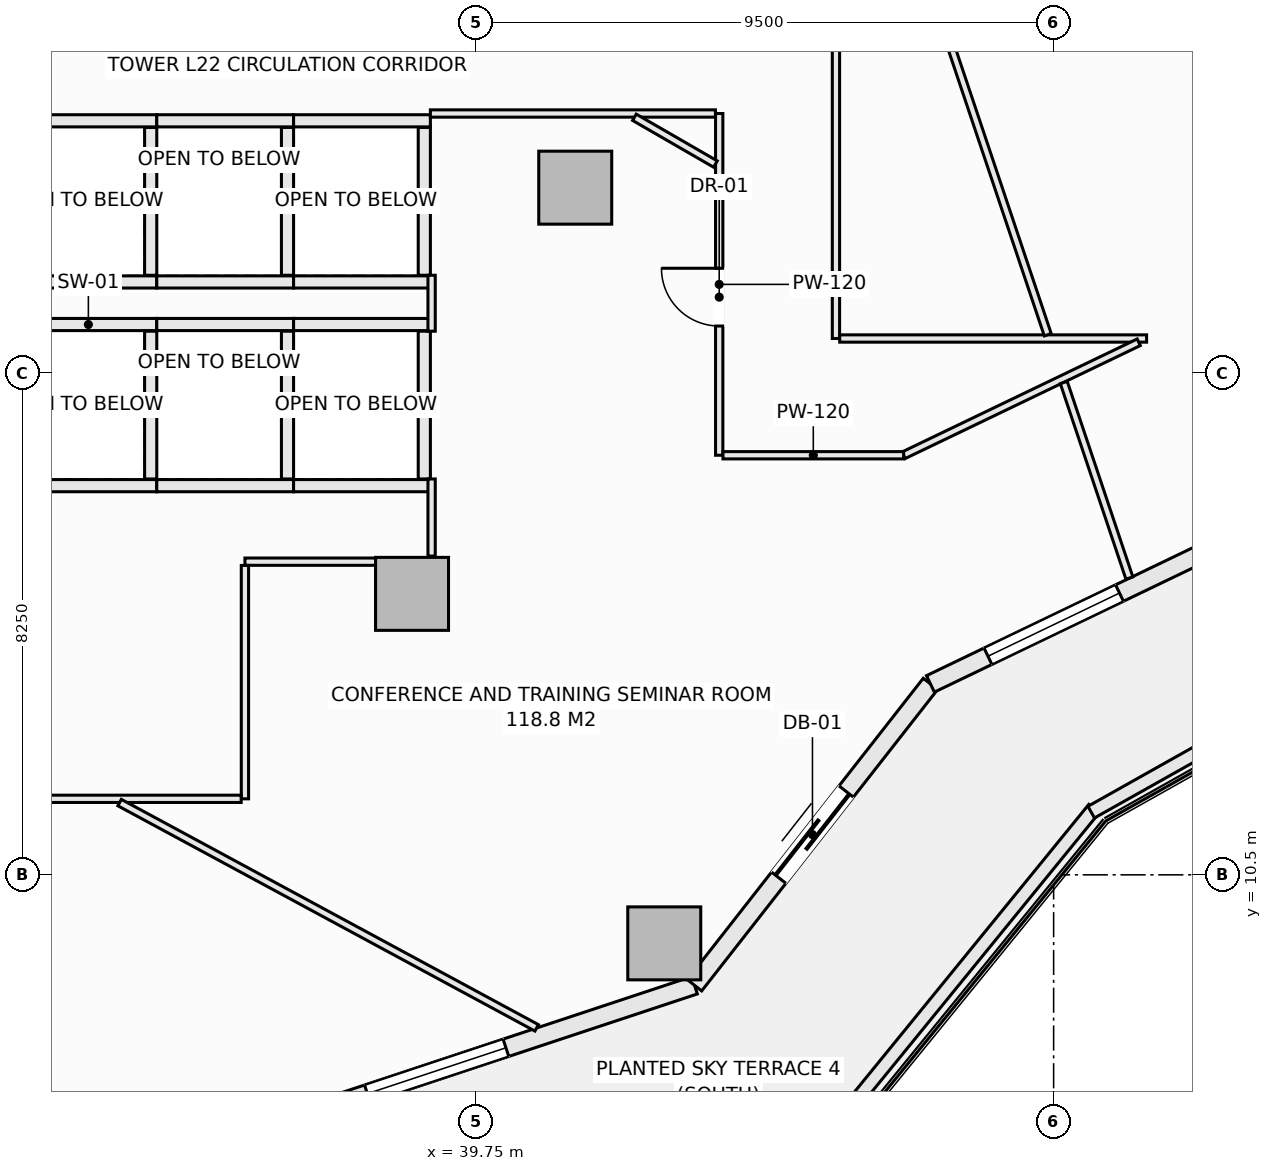
"""IFC4 building model, lengths in metres.
Left out: names, types, materials, properties, quantities, classifications, styles, units other than length and angle.
Written with IfcOpenShell. Run it as: python <this file> out.ifc"""

import sys

from ifc_helpers import new_model, si_unit, direction, frame, frame_2d, origin, origin_2d, place, context, subcontext, project, spatial, rectangle, extrude, element, fill, save


model = new_model("IFC4")
c1 = context("Model", 3, precision=1e-05, world=origin(), true_north=direction((0.0, 1.0)))
c2 = subcontext(c1, "Body", "Model", "MODEL_VIEW")
j1 = project(units=[si_unit("LENGTHUNIT", "METRE"), si_unit("PLANEANGLEUNIT", "RADIAN")], contexts=[c1])
p1 = place(None, origin())
s1 = spatial("IfcSite", under=j1, at=p1, CompositionType="ELEMENT")
p2 = place(p1, origin())
s2 = spatial("IfcBuilding", under=s1, at=p2, CompositionType="ELEMENT")
p3 = place(p2, frame((0.0, 0.0, 91.95)))
s3 = spatial("IfcBuildingStorey", under=s2, at=p3, CompositionType="ELEMENT", Elevation=91.95)
for number, where, z_axis, x_axis in (
    (1, (42.846, 9.373, -0.28), (0.0, 0.0, 1.0), (1.0, 0.0, 0.0)),
    (2, (38.698, 15.121, -0.28), (0.0, 0.0, 1.0), (1.0, 0.0, 0.0)),
    (3, (41.382, 21.801, -0.28), (0.0, 0.0, 1.0), (1.0, 0.0, 0.0)),
):
    element("IfcColumn", number, at=place(p3, frame(where, z_axis=z_axis, x_axis=x_axis)), inside=s3, PredefinedType="COLUMN", context=c2, shape_type="SweptSolid", body=[
        extrude(rectangle(XDim=1.2, YDim=1.2, at=origin_2d()), origin(), (0.0, 0.0, 1.0), 3.81),
    ])
p4 = place(p3, frame((36.968, 6.571, 0.0), z_axis=(0.0, 0.0, 1.0), x_axis=(0.949245153629, 0.314537181127, 0.0)))
e4 = element("IfcWall", 4, at=p4, inside=s3, PredefinedType="SOLIDWALL", context=c2, shape_type="SweptSolid", body=[
    extrude(rectangle(XDim=6.717, YDim=0.3, at=frame_2d((3.358, 0.0))), origin(), (0.0, 0.0, 1.0), 3.053),
])
p5 = place(p4, frame((1.05, 0.0, 0.85)))
e5 = element("IfcOpeningElement", 5, at=p5, cuts=e4, PredefinedType="OPENING", context=c2, shape_type="SweptSolid", body=[
    extrude(rectangle(XDim=2.4, YDim=1.9, at=frame_2d((1.2, 0.95))), frame((0.0, 0.16, 0.0), z_axis=(0.0, -1.0, 0.0), x_axis=(1.0, 0.0, 0.0)), (0.0, 0.0, 1.0), 0.32),
])
p6 = place(p3, frame((43.344, 8.684, 0.0), z_axis=(0.0, 0.0, 1.0), x_axis=(0.616434798832, 0.78740595552, 0.0)))
e6 = element("IfcWall", 6, at=p6, inside=s3, PredefinedType="SOLIDWALL", context=c2, shape_type="SweptSolid", body=[
    extrude(rectangle(XDim=6.294, YDim=0.3, at=frame_2d((3.147, 0.0))), origin(), (0.0, 0.0, 1.0), 3.053),
])
p7 = place(p6, frame((2.247, 0.0, 0.0)))
e7 = element("IfcOpeningElement", 7, at=p7, cuts=e6, PredefinedType="OPENING", context=c2, shape_type="SweptSolid", body=[
    extrude(rectangle(XDim=1.8, YDim=2.25, at=frame_2d((0.9, 1.125))), frame((0.0, 0.16, 0.0), z_axis=(0.0, -1.0, 0.0), x_axis=(1.0, 0.0, 0.0)), (0.0, 0.0, 1.0), 0.32),
])
p8 = place(p3, frame((47.224, 13.64, 0.0), z_axis=(0.0, 0.0, 1.0), x_axis=(0.901354747727, 0.433081538224, 0.0)))
e8 = element("IfcWall", 8, at=p8, inside=s3, PredefinedType="SOLIDWALL", context=c2, shape_type="SweptSolid", body=[
    extrude(rectangle(XDim=6.431, YDim=0.3, at=frame_2d((3.215, 0.0))), origin(), (0.0, 0.0, 1.0), 3.053),
])
p9 = place(p8, frame((1.05, 0.0, 0.85)))
e9 = element("IfcOpeningElement", 9, at=p9, cuts=e8, PredefinedType="OPENING", context=c2, shape_type="SweptSolid", body=[
    extrude(rectangle(XDim=2.4, YDim=1.9, at=frame_2d((1.2, 0.95))), frame((0.0, 0.16, 0.0), z_axis=(0.0, -1.0, 0.0), x_axis=(1.0, 0.0, 0.0)), (0.0, 0.0, 1.0), 0.32),
])
p10 = place(p3, frame((45.292, 5.918, 0.0), z_axis=(0.0, 0.0, 1.0), x_axis=(0.631819273026, 0.775115737315, 0.0)))
e10 = element("IfcWall", 10, at=p10, inside=s3, PredefinedType="PARAPET", context=c2, shape_type="SweptSolid", body=[
    extrude(rectangle(XDim=7.316, YDim=0.22, at=frame_2d((3.658, 0.0))), origin(), (0.0, 0.0, 1.0), 0.52),
])
p11 = place(p3, frame((49.868, 11.531, 0.0), z_axis=(0.0, 0.0, 1.0), x_axis=(0.871775109335, 0.489906275468, 0.0)))
e11 = element("IfcWall", 11, at=p11, inside=s3, PredefinedType="PARAPET", context=c2, shape_type="SweptSolid", body=[
    extrude(rectangle(XDim=7.152, YDim=0.22, at=frame_2d((3.576, 0.0))), origin(), (0.0, 0.0, 1.0), 0.52),
])
for number, where, z_axis, x_axis in (
    (12, (32.25, 19.55, 0.0), (0.0, 0.0, 1.0), (1.0, 0.0, 0.0)),
    (13, (32.25, 16.9, 0.0), (0.0, 0.0, 1.0), (1.0, 0.0, 0.0)),
):
    element("IfcWall", number, at=place(p3, frame(where, z_axis=z_axis, x_axis=x_axis)), inside=s3, PredefinedType="SOLIDWALL", context=c2, shape_type="SweptSolid", body=[
        extrude(rectangle(XDim=2.25, YDim=0.2, at=frame_2d((1.125, 0.0))), origin(), (0.0, 0.0, 1.0), 3.53),
    ])
p12 = place(p3, frame((34.4, 17.01, 0.0), z_axis=(0.0, 0.0, 1.0), x_axis=(0.0, 1.0, 0.0)))
e14 = element("IfcWall", 14, at=p12, inside=s3, PredefinedType="SOLIDWALL", context=c2, shape_type="SweptSolid", body=[
    extrude(rectangle(XDim=2.43, YDim=0.2, at=frame_2d((1.215, 0.0))), origin(), (0.0, 0.0, 1.0), 3.53),
])
for number, where, z_axis, x_axis in (
    (15, (34.5, 19.55, 0.0), (0.0, 0.0, 1.0), (1.0, 0.0, 0.0)),
    (16, (34.5, 16.9, 0.0), (0.0, 0.0, 1.0), (1.0, 0.0, 0.0)),
):
    element("IfcWall", number, at=place(p3, frame(where, z_axis=z_axis, x_axis=x_axis)), inside=s3, PredefinedType="SOLIDWALL", context=c2, shape_type="SweptSolid", body=[
        extrude(rectangle(XDim=2.25, YDim=0.2, at=frame_2d((1.125, 0.0))), origin(), (0.0, 0.0, 1.0), 3.53),
    ])
p13 = place(p3, frame((36.65, 17.01, 0.0), z_axis=(0.0, 0.0, 1.0), x_axis=(0.0, 1.0, 0.0)))
e17 = element("IfcWall", 17, at=p13, inside=s3, PredefinedType="SOLIDWALL", context=c2, shape_type="SweptSolid", body=[
    extrude(rectangle(XDim=2.43, YDim=0.2, at=frame_2d((1.215, 0.0))), origin(), (0.0, 0.0, 1.0), 3.53),
])
for number, where, z_axis, x_axis in (
    (18, (36.75, 19.55, 0.0), (0.0, 0.0, 1.0), (1.0, 0.0, 0.0)),
    (19, (36.75, 16.9, 0.0), (0.0, 0.0, 1.0), (1.0, 0.0, 0.0)),
):
    element("IfcWall", number, at=place(p3, frame(where, z_axis=z_axis, x_axis=x_axis)), inside=s3, PredefinedType="SOLIDWALL", context=c2, shape_type="SweptSolid", body=[
        extrude(rectangle(XDim=2.25, YDim=0.2, at=frame_2d((1.125, 0.0))), origin(), (0.0, 0.0, 1.0), 3.53),
    ])
p14 = place(p3, frame((38.9, 17.01, 0.0), z_axis=(0.0, 0.0, 1.0), x_axis=(0.0, 1.0, 0.0)))
e20 = element("IfcWall", 20, at=p14, inside=s3, PredefinedType="SOLIDWALL", context=c2, shape_type="SweptSolid", body=[
    extrude(rectangle(XDim=2.43, YDim=0.2, at=frame_2d((1.215, 0.0))), origin(), (0.0, 0.0, 1.0), 3.53),
])
for number, where, z_axis, x_axis in (
    (21, (32.25, 22.9, 0.0), (0.0, 0.0, 1.0), (1.0, 0.0, 0.0)),
    (22, (32.25, 20.25, 0.0), (0.0, 0.0, 1.0), (1.0, 0.0, 0.0)),
):
    element("IfcWall", number, at=place(p3, frame(where, z_axis=z_axis, x_axis=x_axis)), inside=s3, PredefinedType="SOLIDWALL", context=c2, shape_type="SweptSolid", body=[
        extrude(rectangle(XDim=2.25, YDim=0.2, at=frame_2d((1.125, 0.0))), origin(), (0.0, 0.0, 1.0), 3.53),
    ])
p15 = place(p3, frame((34.4, 20.36, 0.0), z_axis=(0.0, 0.0, 1.0), x_axis=(0.0, 1.0, 0.0)))
e23 = element("IfcWall", 23, at=p15, inside=s3, PredefinedType="SOLIDWALL", context=c2, shape_type="SweptSolid", body=[
    extrude(rectangle(XDim=2.43, YDim=0.2, at=frame_2d((1.215, 0.0))), origin(), (0.0, 0.0, 1.0), 3.53),
])
for number, where, z_axis, x_axis in (
    (24, (34.5, 22.9, 0.0), (0.0, 0.0, 1.0), (1.0, 0.0, 0.0)),
    (25, (34.5, 20.25, 0.0), (0.0, 0.0, 1.0), (1.0, 0.0, 0.0)),
):
    element("IfcWall", number, at=place(p3, frame(where, z_axis=z_axis, x_axis=x_axis)), inside=s3, PredefinedType="SOLIDWALL", context=c2, shape_type="SweptSolid", body=[
        extrude(rectangle(XDim=2.25, YDim=0.2, at=frame_2d((1.125, 0.0))), origin(), (0.0, 0.0, 1.0), 3.53),
    ])
p16 = place(p3, frame((36.65, 20.36, 0.0), z_axis=(0.0, 0.0, 1.0), x_axis=(0.0, 1.0, 0.0)))
e26 = element("IfcWall", 26, at=p16, inside=s3, PredefinedType="SOLIDWALL", context=c2, shape_type="SweptSolid", body=[
    extrude(rectangle(XDim=2.43, YDim=0.2, at=frame_2d((1.215, 0.0))), origin(), (0.0, 0.0, 1.0), 3.53),
])
for number, where, z_axis, x_axis in (
    (27, (36.75, 22.9, 0.0), (0.0, 0.0, 1.0), (1.0, 0.0, 0.0)),
    (28, (36.75, 20.25, 0.0), (0.0, 0.0, 1.0), (1.0, 0.0, 0.0)),
):
    element("IfcWall", number, at=place(p3, frame(where, z_axis=z_axis, x_axis=x_axis)), inside=s3, PredefinedType="SOLIDWALL", context=c2, shape_type="SweptSolid", body=[
        extrude(rectangle(XDim=2.25, YDim=0.2, at=frame_2d((1.125, 0.0))), origin(), (0.0, 0.0, 1.0), 3.53),
    ])
p17 = place(p3, frame((38.9, 20.36, 0.0), z_axis=(0.0, 0.0, 1.0), x_axis=(0.0, 1.0, 0.0)))
e29 = element("IfcWall", 29, at=p17, inside=s3, PredefinedType="SOLIDWALL", context=c2, shape_type="SweptSolid", body=[
    extrude(rectangle(XDim=2.43, YDim=0.2, at=frame_2d((1.215, 0.0))), origin(), (0.0, 0.0, 1.0), 3.53),
])
p18 = place(p3, frame((35.95, 15.65, 0.0), z_axis=(0.0, 0.0, 1.0), x_axis=(1.0, 0.0, 0.0)))
e30 = element("IfcWall", 30, at=p18, inside=s3, PredefinedType="PARTITIONING", context=c2, shape_type="SweptSolid", body=[
    extrude(rectangle(XDim=2.291, YDim=0.12, at=frame_2d((1.146, 0.0))), origin(), (0.0, 0.0, 1.0), 3.53),
])
p19 = place(p3, frame((35.95, 11.75, 0.0), z_axis=(0.0, 0.0, 1.0), x_axis=(0.0, 1.0, 0.0)))
e31 = element("IfcWall", 31, at=p19, inside=s3, PredefinedType="PARTITIONING", context=c2, shape_type="SweptSolid", body=[
    extrude(rectangle(XDim=3.838, YDim=0.12, at=frame_2d((1.919, 0.0))), origin(), (0.0, 0.0, 1.0), 3.53),
])
p20 = place(p3, frame((27.242, 11.75, 0.0), z_axis=(0.0, 0.0, 1.0), x_axis=(1.0, 0.0, 0.0)))
e32 = element("IfcWall", 32, at=p20, inside=s3, PredefinedType="PARTITIONING", context=c2, shape_type="SweptSolid", body=[
    extrude(rectangle(XDim=8.646, YDim=0.12, at=frame_2d((4.323, 0.0))), origin(), (0.0, 0.0, 1.0), 3.53),
])
p21 = place(p20, frame((3.186, 0.0, 0.0)))
e33 = element("IfcOpeningElement", 33, at=p21, cuts=e32, PredefinedType="OPENING", context=c2, shape_type="SweptSolid", body=[
    extrude(rectangle(XDim=0.95, YDim=2.1, at=frame_2d((0.475, 1.05))), frame((0.0, 0.07, 0.0), z_axis=(0.0, -1.0, 0.0), x_axis=(1.0, 0.0, 0.0)), (0.0, 0.0, 1.0), 0.14),
])
p22 = place(p3, frame((43.75, 17.4, 0.0), z_axis=(0.0, 0.0, 1.0), x_axis=(0.0, 1.0, 0.0)))
e34 = element("IfcWall", 34, at=p22, inside=s3, PredefinedType="PARTITIONING", context=c2, shape_type="SweptSolid", body=[
    extrude(rectangle(XDim=5.62, YDim=0.12, at=frame_2d((2.81, 0.0))), origin(), (0.0, 0.0, 1.0), 3.53),
])
p23 = place(p22, frame((2.125, 0.0, 0.0)))
e35 = element("IfcOpeningElement", 35, at=p23, cuts=e34, PredefinedType="OPENING", context=c2, shape_type="SweptSolid", body=[
    extrude(rectangle(XDim=0.95, YDim=2.1, at=frame_2d((0.475, 1.05))), frame((0.0, 0.07, 0.0), z_axis=(0.0, -1.0, 0.0), x_axis=(1.0, 0.0, 0.0)), (0.0, 0.0, 1.0), 0.14),
])
p24 = place(p3, frame((45.67, 19.32, 0.0), z_axis=(0.0, 0.0, 1.0), x_axis=(0.0, 1.0, 0.0)))
e36 = element("IfcWall", 36, at=p24, inside=s3, PredefinedType="PARTITIONING", context=c2, shape_type="SweptSolid", body=[
    extrude(rectangle(XDim=14.798, YDim=0.12, at=frame_2d((7.399, 0.0))), origin(), (0.0, 0.0, 1.0), 3.53),
])
p25 = place(p24, frame((11.458, 0.0, 0.0)))
e37 = element("IfcOpeningElement", 37, at=p25, cuts=e36, PredefinedType="OPENING", context=c2, shape_type="SweptSolid", body=[
    extrude(rectangle(XDim=0.95, YDim=2.1, at=frame_2d((0.475, 1.05))), frame((0.0, 0.07, 0.0), z_axis=(0.0, -1.0, 0.0), x_axis=(1.0, 0.0, 0.0)), (0.0, 0.0, 1.0), 0.14),
])
p26 = place(p3, frame((45.732, 19.32, 0.0), z_axis=(0.0, 0.0, 1.0), x_axis=(1.0, 0.0, 0.0)))
e38 = element("IfcWall", 38, at=p26, inside=s3, PredefinedType="PARTITIONING", context=c2, shape_type="SweptSolid", body=[
    extrude(rectangle(XDim=5.047, YDim=0.12, at=frame_2d((2.523, 0.0))), origin(), (0.0, 0.0, 1.0), 3.165),
])
p27 = place(p3, frame((46.783, 17.4, 0.0), z_axis=(0.0, 0.0, 1.0), x_axis=(0.901339159108, 0.433113980679, 0.0)))
e39 = element("IfcWall", 39, at=p27, inside=s3, PredefinedType="PARTITIONING", context=c2, shape_type="SweptSolid", body=[
    extrude(rectangle(XDim=4.29, YDim=0.12, at=frame_2d((2.145, 0.0))), origin(), (0.0, 0.0, 1.0), 3.53),
])
p28 = place(p3, frame((43.812, 17.4, 0.0), z_axis=(0.0, 0.0, 1.0), x_axis=(1.0, 0.0, 0.0)))
e40 = element("IfcWall", 40, at=p28, inside=s3, PredefinedType="PARTITIONING", context=c2, shape_type="SweptSolid", body=[
    extrude(rectangle(XDim=2.971, YDim=0.12, at=frame_2d((1.485, 0.0))), origin(), (0.0, 0.0, 1.0), 3.53),
])
p29 = place(p3, frame((39.0, 23.02, 0.0), z_axis=(0.0, 0.0, 1.0), x_axis=(1.0, 0.0, 0.0)))
e41 = element("IfcWall", 41, at=p29, inside=s3, PredefinedType="PARTITIONING", context=c2, shape_type="SweptSolid", body=[
    extrude(rectangle(XDim=4.688, YDim=0.12, at=frame_2d((2.344, 0.0))), origin(), (0.0, 0.0, 1.0), 3.53),
])
p30 = place(p3, frame((39.02, 15.742, 0.0), z_axis=(0.0, 0.0, 1.0), x_axis=(0.0, 1.0, 0.0)))
e42 = element("IfcWall", 42, at=p30, inside=s3, PredefinedType="PARTITIONING", context=c2, shape_type="SweptSolid", body=[
    extrude(rectangle(XDim=1.268, YDim=0.12, at=frame_2d((0.634, 0.0))), origin(), (0.0, 0.0, 1.0), 2.894),
])
p31 = place(p3, frame((39.02, 19.44, 0.0), z_axis=(0.0, 0.0, 1.0), x_axis=(0.0, 1.0, 0.0)))
e43 = element("IfcWall", 43, at=p31, inside=s3, PredefinedType="PARTITIONING", context=c2, shape_type="SweptSolid", body=[
    extrude(rectangle(XDim=0.92, YDim=0.12, at=frame_2d((0.46, 0.0))), origin(), (0.0, 0.0, 1.0), 3.53),
])
p32 = place(p3, frame((33.889, 11.688, 0.0), z_axis=(0.0, 0.0, 1.0), x_axis=(0.879862970093, -0.475227475909, 0.0)))
e44 = element("IfcWall", 44, at=p32, inside=s3, PredefinedType="PARTITIONING", context=c2, shape_type="SweptSolid", body=[
    extrude(rectangle(XDim=7.795, YDim=0.12, at=frame_2d((3.898, 0.0))), origin(), (0.0, 0.0, 1.0), 3.53),
])
p33 = place(p3, frame((42.355, 22.958, 0.0), z_axis=(0.0, 0.0, 1.0), x_axis=(0.866037617598, -0.499978844458, 0.0)))
e45 = element("IfcWall", 45, at=p33, inside=s3, PredefinedType="PARTITIONING", context=c2, shape_type="SweptSolid", body=[
    extrude(rectangle(XDim=1.539, YDim=0.12, at=frame_2d((0.769, 0.0))), origin(), (0.0, 0.0, 1.0), 3.53),
])
p34 = place(p3, frame((45.732, 29.579, 0.0), z_axis=(0.0, 0.0, 1.0), x_axis=(0.318099793934, -0.948057235139, 0.0)))
e46 = element("IfcWall", 46, at=p34, inside=s3, PredefinedType="PARTITIONING", context=c2, shape_type="SweptSolid", body=[
    extrude(rectangle(XDim=10.756, YDim=0.12, at=frame_2d((5.378, 0.0))), origin(), (0.0, 0.0, 1.0), 3.53),
])
p35 = place(p3, frame((49.417, 18.597, 0.0), z_axis=(0.0, 0.0, 1.0), x_axis=(0.318105552227, -0.948055303051, 0.0)))
e47 = element("IfcWall", 47, at=p35, inside=s3, PredefinedType="PARTITIONING", context=c2, shape_type="SweptSolid", body=[
    extrude(rectangle(XDim=3.392, YDim=0.12, at=frame_2d((1.696, 0.0))), origin(), (0.0, 0.0, 1.0), 3.53),
])
p36 = place(p5, origin())
e48 = element("IfcWindow", 48, at=p36, inside=s3, PartitioningType="SINGLE_PANEL", PredefinedType="WINDOW", context=c2, shape_type="SweptSolid", body=[
    extrude(rectangle(XDim=2.4, YDim=1.9, at=frame_2d((1.2, 0.95))), frame((0.0, 0.03, 0.0), z_axis=(0.0, -1.0, 0.0), x_axis=(1.0, 0.0, 0.0)), (0.0, 0.0, 1.0), 0.06),
])
fill(e5, e48)
p37 = place(p7, frame((1.8, 0.0, 0.0), z_axis=(0.0, 0.0, 1.0), x_axis=(-1.0, 0.0, 0.0)))
e49 = element("IfcDoor", 49, at=p37, inside=s3, OperationType="SLIDING_TO_LEFT", PredefinedType="DOOR", context=c2, shape_type="SweptSolid", body=[
    extrude(rectangle(XDim=1.8, YDim=2.25, at=frame_2d((0.9, 1.125))), frame((0.0, 0.025, 0.0), z_axis=(0.0, -1.0, 0.0), x_axis=(1.0, 0.0, 0.0)), (0.0, 0.0, 1.0), 0.05),
])
fill(e7, e49)
p38 = place(p9, origin())
e50 = element("IfcWindow", 50, at=p38, inside=s3, PartitioningType="SINGLE_PANEL", PredefinedType="WINDOW", context=c2, shape_type="SweptSolid", body=[
    extrude(rectangle(XDim=2.4, YDim=1.9, at=frame_2d((1.2, 0.95))), frame((0.0, 0.03, 0.0), z_axis=(0.0, -1.0, 0.0), x_axis=(1.0, 0.0, 0.0)), (0.0, 0.0, 1.0), 0.06),
])
fill(e9, e50)
p39 = place(p23, origin())
e51 = element("IfcDoor", 51, at=p39, inside=s3, OperationType="SINGLE_SWING_RIGHT", PredefinedType="DOOR", context=c2, shape_type="SweptSolid", body=[
    extrude(rectangle(XDim=0.95, YDim=2.1, at=frame_2d((0.475, 1.05))), frame((0.0, 0.025, 0.0), z_axis=(0.0, -1.0, 0.0), x_axis=(1.0, 0.0, 0.0)), (0.0, 0.0, 1.0), 0.05),
])
fill(e35, e51)
save(model, sys.argv[1])
